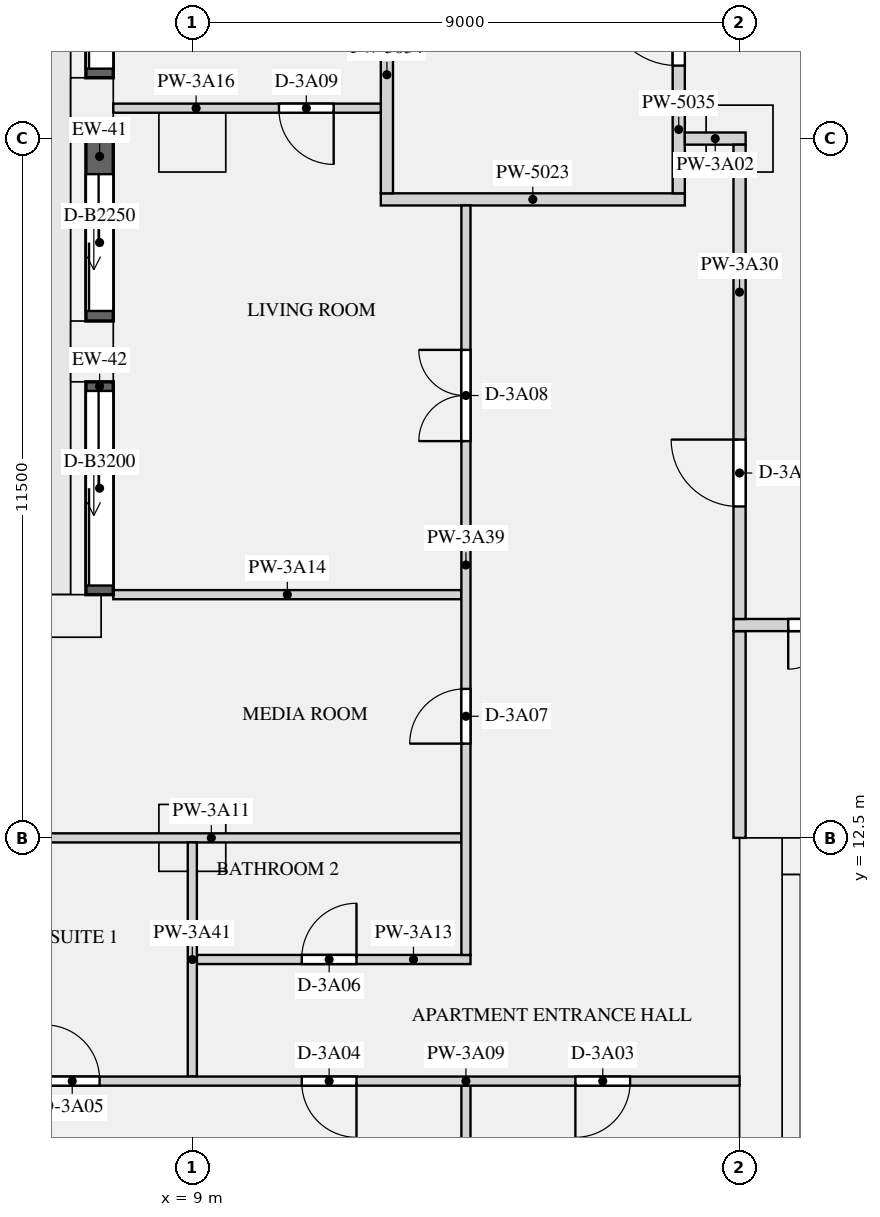
"""IFC4 building model, lengths in metres.
Left out: names, types, materials, properties, quantities, classifications, styles, units other than length and angle.
Written with IfcOpenShell. Run it as: python <this file> out.ifc"""

import sys

from ifc_helpers import new_model, si_unit, direction, frame, frame_2d, origin, origin_2d, place, context, subcontext, project, spatial, rectangle, extrude, element, fill, save


model = new_model("IFC4")
c1 = context("Model", 3, precision=1e-05, world=origin(), true_north=direction((0.0, 1.0)))
c2 = subcontext(c1, "Body", "Model", "MODEL_VIEW")
j1 = project(units=[si_unit("LENGTHUNIT", "METRE"), si_unit("PLANEANGLEUNIT", "RADIAN")], contexts=[c1])
p1 = place(None, origin())
s1 = spatial("IfcSite", under=j1, at=p1, CompositionType="ELEMENT")
p2 = place(p1, origin())
s2 = spatial("IfcBuilding", under=s1, at=p2, CompositionType="ELEMENT")
p3 = place(p2, frame((0.0, 0.0, 141.3)))
s3 = spatial("IfcBuildingStorey", under=s2, at=p3, CompositionType="ELEMENT", Elevation=141.3)
for number, where, z_axis, x_axis in (
    (1, (7.35, 24.5, 0.0), (0.0, 0.0, 1.0), (0.0, -1.0, 0.0)),
    (2, (7.35, 20.5, 0.0), (0.0, 0.0, 1.0), (0.0, -1.0, 0.0)),
    (3, (7.0, 16.15, 0.0), (0.0, 0.0, 1.0), (-1.0, 0.0, 0.0)),
):
    element("IfcColumn", number, at=place(p3, frame(where, z_axis=z_axis, x_axis=x_axis)), inside=s3, PredefinedType="USERDEFINED", context=c2, shape_type="SweptSolid", body=[
        extrude(rectangle(XDim=1.0, YDim=0.7, at=origin_2d()), origin(), (0.0, 0.0, 1.0), 3.15),
    ])
for number, where, z_axis, x_axis in (
    (4, (9.0, 24.0, 0.0), (0.0, 0.0, 1.0), (1.0, 0.0, 0.0)),
    (5, (18.0, 24.0, 0.0), (0.0, 0.0, 1.0), (1.0, 0.0, 0.0)),
    (6, (9.0, 12.5, 0.0), (0.0, 0.0, 1.0), (1.0, 0.0, 0.0)),
):
    element("IfcColumn", number, at=place(p3, frame(where, z_axis=z_axis, x_axis=x_axis)), inside=s3, PredefinedType="COLUMN", context=c2, shape_type="SweptSolid", body=[
        extrude(rectangle(XDim=1.1, YDim=1.1, at=origin_2d()), origin(), (0.0, 0.0, 1.0), 3.15),
    ])
p4 = place(p3, frame((18.35, 0.0, 0.0), z_axis=(0.0, 0.0, 1.0), x_axis=(0.0, 1.0, 0.0)))
e7 = element("IfcWall", 7, at=p4, inside=s3, PredefinedType="SHEAR", context=c2, shape_type="SweptSolid", body=[
    extrude(rectangle(XDim=12.5, YDim=0.7, at=frame_2d((6.25, 0.0))), origin(), (0.0, 0.0, 1.0), 3.15),
])
p5 = place(p3, frame((18.7, 12.2, 0.0), z_axis=(0.0, 0.0, 1.0), x_axis=(1.0, 0.0, 0.0)))
e8 = element("IfcWall", 8, at=p5, inside=s3, PredefinedType="SHEAR", context=c2, shape_type="SweptSolid", body=[
    extrude(rectangle(XDim=34.6, YDim=0.6, at=frame_2d((17.3, 0.0))), origin(), (0.0, 0.0, 1.0), 3.15),
])
p6 = place(p5, frame((24.475, 0.0, 0.0)))
e9 = element("IfcOpeningElement", 9, at=p6, cuts=e8, PredefinedType="OPENING", context=c2, shape_type="SweptSolid", body=[
    extrude(rectangle(XDim=1.1, YDim=2.1, at=frame_2d((0.55, 1.05))), frame((0.0, 0.31, 0.0), z_axis=(0.0, -1.0, 0.0), x_axis=(1.0, 0.0, 0.0)), (0.0, 0.0, 1.0), 0.62),
])
p7 = place(p5, frame((26.725, 0.0, 0.0)))
e10 = element("IfcOpeningElement", 10, at=p7, cuts=e8, PredefinedType="OPENING", context=c2, shape_type="SweptSolid", body=[
    extrude(rectangle(XDim=1.1, YDim=2.1, at=frame_2d((0.55, 1.05))), frame((0.0, 0.31, 0.0), z_axis=(0.0, -1.0, 0.0), x_axis=(1.0, 0.0, 0.0)), (0.0, 0.0, 1.0), 0.62),
])
p8 = place(p5, frame((28.975, 0.0, 0.0)))
e11 = element("IfcOpeningElement", 11, at=p8, cuts=e8, PredefinedType="OPENING", context=c2, shape_type="SweptSolid", body=[
    extrude(rectangle(XDim=1.1, YDim=2.1, at=frame_2d((0.55, 1.05))), frame((0.0, 0.31, 0.0), z_axis=(0.0, -1.0, 0.0), x_axis=(1.0, 0.0, 0.0)), (0.0, 0.0, 1.0), 0.62),
])
p9 = place(p5, frame((14.35, 0.0, 0.0)))
e12 = element("IfcOpeningElement", 12, at=p9, cuts=e8, PredefinedType="OPENING", context=c2, shape_type="SweptSolid", body=[
    extrude(rectangle(XDim=0.9, YDim=2.1, at=frame_2d((0.45, 1.05))), frame((0.0, 0.31, 0.0), z_axis=(0.0, -1.0, 0.0), x_axis=(1.0, 0.0, 0.0)), (0.0, 0.0, 1.0), 0.62),
])
p10 = place(p5, frame((1.45, 0.0, 0.0)))
e13 = element("IfcOpeningElement", 13, at=p10, cuts=e8, PredefinedType="OPENING", context=c2, shape_type="SweptSolid", body=[
    extrude(rectangle(XDim=1.2, YDim=2.1, at=frame_2d((0.6, 1.05))), frame((0.0, 0.31, 0.0), z_axis=(0.0, -1.0, 0.0), x_axis=(1.0, 0.0, 0.0)), (0.0, 0.0, 1.0), 0.62),
])
p11 = place(p5, frame((31.95, 0.0, 0.0)))
e14 = element("IfcOpeningElement", 14, at=p11, cuts=e8, PredefinedType="OPENING", context=c2, shape_type="SweptSolid", body=[
    extrude(rectangle(XDim=1.2, YDim=2.1, at=frame_2d((0.6, 1.05))), frame((0.0, 0.31, 0.0), z_axis=(0.0, -1.0, 0.0), x_axis=(1.0, 0.0, 0.0)), (0.0, 0.0, 1.0), 0.62),
])
p12 = place(p3, frame((18.85, 1.0, 0.0), z_axis=(0.0, 0.0, 1.0), x_axis=(0.0, 1.0, 0.0)))
e15 = element("IfcWall", 15, at=p12, inside=s3, PredefinedType="SHEAR", context=c2, shape_type="SweptSolid", body=[
    extrude(rectangle(XDim=10.9, YDim=0.3, at=frame_2d((5.45, 0.0))), origin(), (0.0, 0.0, 1.0), 3.15),
])
p13 = place(p3, frame((7.475, 28.0, 0.0), z_axis=(0.0, 0.0, 1.0), x_axis=(0.0, -1.0, 0.0)))
e16 = element("IfcWall", 16, at=p13, inside=s3, PredefinedType="SOLIDWALL", context=c2, shape_type="SweptSolid", body=[
    extrude(rectangle(XDim=3.0, YDim=0.45, at=frame_2d((1.5, 0.0))), origin(), (0.0, 0.0, 1.0), 2.83),
])
p14 = place(p13, frame((0.15, 0.0, 0.0)))
e17 = element("IfcOpeningElement", 17, at=p14, cuts=e16, PredefinedType="OPENING", context=c2, shape_type="SweptSolid", body=[
    extrude(rectangle(XDim=2.7, YDim=2.3, at=frame_2d((1.35, 1.15))), frame((0.0, 0.235, 0.0), z_axis=(0.0, -1.0, 0.0), x_axis=(1.0, 0.0, 0.0)), (0.0, 0.0, 1.0), 0.47),
])
p15 = place(p3, frame((7.475, 24.0, 0.0), z_axis=(0.0, 0.0, 1.0), x_axis=(0.0, -1.0, 0.0)))
e18 = element("IfcWall", 18, at=p15, inside=s3, PredefinedType="SOLIDWALL", context=c2, shape_type="SweptSolid", body=[
    extrude(rectangle(XDim=3.0, YDim=0.45, at=frame_2d((1.5, 0.0))), origin(), (0.0, 0.0, 1.0), 2.83),
])
p16 = place(p15, frame((0.585, 0.0, 0.0)))
e19 = element("IfcOpeningElement", 19, at=p16, cuts=e18, PredefinedType="OPENING", context=c2, shape_type="SweptSolid", body=[
    extrude(rectangle(XDim=2.25, YDim=2.3, at=frame_2d((1.125, 1.15))), frame((0.0, 0.235, 0.0), z_axis=(0.0, -1.0, 0.0), x_axis=(1.0, 0.0, 0.0)), (0.0, 0.0, 1.0), 0.47),
])
p17 = place(p3, frame((7.475, 20.0, 0.0), z_axis=(0.0, 0.0, 1.0), x_axis=(0.0, -1.0, 0.0)))
e20 = element("IfcWall", 20, at=p17, inside=s3, PredefinedType="SOLIDWALL", context=c2, shape_type="SweptSolid", body=[
    extrude(rectangle(XDim=3.5, YDim=0.45, at=frame_2d((1.75, 0.0))), origin(), (0.0, 0.0, 1.0), 2.83),
])
p18 = place(p17, frame((0.15, 0.0, 0.0)))
e21 = element("IfcOpeningElement", 21, at=p18, cuts=e20, PredefinedType="OPENING", context=c2, shape_type="SweptSolid", body=[
    extrude(rectangle(XDim=3.2, YDim=2.3, at=frame_2d((1.6, 1.15))), frame((0.0, 0.235, 0.0), z_axis=(0.0, -1.0, 0.0), x_axis=(1.0, 0.0, 0.0)), (0.0, 0.0, 1.0), 0.47),
])
p19 = place(p3, frame((12.1, 23.0, 0.0), z_axis=(0.0, 0.0, 1.0), x_axis=(1.0, 0.0, 0.0)))
e22 = element("IfcWall", 22, at=p19, inside=s3, PredefinedType="PARTITIONING", context=c2, shape_type="SweptSolid", body=[
    extrude(rectangle(XDim=5.0, YDim=0.2, at=frame_2d((2.5, 0.0))), origin(), (0.0, 0.0, 1.0), 2.83),
])
p20 = place(p3, frame((18.0, 12.5, 0.0), z_axis=(0.0, 0.0, 1.0), x_axis=(0.0, 1.0, 0.0)))
e23 = element("IfcWall", 23, at=p20, inside=s3, PredefinedType="PARTITIONING", context=c2, shape_type="SweptSolid", body=[
    extrude(rectangle(XDim=3.4, YDim=0.2, at=frame_2d((1.7, 0.0))), origin(), (0.0, 0.0, 1.0), 2.83),
])
p21 = place(p3, frame((12.2, 23.1, 0.0), z_axis=(0.0, 0.0, 1.0), x_axis=(0.0, 1.0, 0.0)))
e24 = element("IfcWall", 24, at=p21, inside=s3, PredefinedType="PARTITIONING", context=c2, shape_type="SweptSolid", body=[
    extrude(rectangle(XDim=3.9, YDim=0.2, at=frame_2d((1.95, 0.0))), origin(), (0.0, 0.0, 1.0), 2.83),
])
p22 = place(p3, frame((17.0, 23.1, 0.0), z_axis=(0.0, 0.0, 1.0), x_axis=(0.0, 1.0, 0.0)))
e25 = element("IfcWall", 25, at=p22, inside=s3, PredefinedType="PARTITIONING", context=c2, shape_type="SweptSolid", body=[
    extrude(rectangle(XDim=3.8, YDim=0.2, at=frame_2d((1.9, 0.0))), origin(), (0.0, 0.0, 1.0), 2.83),
])
p23 = place(p22, frame((2.1, 0.0, 0.0)))
e26 = element("IfcOpeningElement", 26, at=p23, cuts=e25, PredefinedType="OPENING", context=c2, shape_type="SweptSolid", body=[
    extrude(rectangle(XDim=1.2, YDim=2.1, at=frame_2d((0.6, 1.05))), frame((0.0, 0.11, 0.0), z_axis=(0.0, -1.0, 0.0), x_axis=(1.0, 0.0, 0.0)), (0.0, 0.0, 1.0), 0.22),
])
p24 = place(p3, frame((17.1, 24.0, 0.0), z_axis=(0.0, 0.0, 1.0), x_axis=(1.0, 0.0, 0.0)))
e27 = element("IfcWall", 27, at=p24, inside=s3, PredefinedType="PARTITIONING", context=c2, shape_type="SweptSolid", body=[
    extrude(rectangle(XDim=1.0, YDim=0.2, at=frame_2d((0.5, 0.0))), origin(), (0.0, 0.0, 1.0), 2.83),
])
p25 = place(p3, frame((5.2, 8.5, 0.0), z_axis=(0.0, 0.0, 1.0), x_axis=(1.0, 0.0, 0.0)))
e28 = element("IfcWall", 28, at=p25, inside=s3, PredefinedType="PARTITIONING", context=c2, shape_type="SweptSolid", body=[
    extrude(rectangle(XDim=12.8, YDim=0.15, at=frame_2d((6.4, 0.0))), origin(), (0.0, 0.0, 1.0), 2.83),
])
p26 = place(p25, frame((10.1, 0.0, 0.0)))
e29 = element("IfcOpeningElement", 29, at=p26, cuts=e28, PredefinedType="OPENING", context=c2, shape_type="SweptSolid", body=[
    extrude(rectangle(XDim=0.9, YDim=2.1, at=frame_2d((0.45, 1.05))), frame((0.0, 0.085, 0.0), z_axis=(0.0, -1.0, 0.0), x_axis=(1.0, 0.0, 0.0)), (0.0, 0.0, 1.0), 0.17),
])
p27 = place(p25, frame((5.6, 0.0, 0.0)))
e30 = element("IfcOpeningElement", 30, at=p27, cuts=e28, PredefinedType="OPENING", context=c2, shape_type="SweptSolid", body=[
    extrude(rectangle(XDim=0.9, YDim=2.1, at=frame_2d((0.45, 1.05))), frame((0.0, 0.085, 0.0), z_axis=(0.0, -1.0, 0.0), x_axis=(1.0, 0.0, 0.0)), (0.0, 0.0, 1.0), 0.17),
])
p28 = place(p25, frame((1.375, 0.0, 0.0)))
e31 = element("IfcOpeningElement", 31, at=p28, cuts=e28, PredefinedType="OPENING", context=c2, shape_type="SweptSolid", body=[
    extrude(rectangle(XDim=0.9, YDim=2.1, at=frame_2d((0.45, 1.05))), frame((0.0, 0.085, 0.0), z_axis=(0.0, -1.0, 0.0), x_axis=(1.0, 0.0, 0.0)), (0.0, 0.0, 1.0), 0.17),
])
p29 = place(p3, frame((5.2, 12.5, 0.0), z_axis=(0.0, 0.0, 1.0), x_axis=(1.0, 0.0, 0.0)))
e32 = element("IfcWall", 32, at=p29, inside=s3, PredefinedType="PARTITIONING", context=c2, shape_type="SweptSolid", body=[
    extrude(rectangle(XDim=8.225, YDim=0.15, at=frame_2d((4.113, 0.0))), origin(), (0.0, 0.0, 1.0), 2.83),
])
p30 = place(p3, frame((9.075, 10.5, 0.0), z_axis=(0.0, 0.0, 1.0), x_axis=(1.0, 0.0, 0.0)))
e33 = element("IfcWall", 33, at=p30, inside=s3, PredefinedType="PARTITIONING", context=c2, shape_type="SweptSolid", body=[
    extrude(rectangle(XDim=4.5, YDim=0.15, at=frame_2d((2.25, 0.0))), origin(), (0.0, 0.0, 1.0), 2.83),
])
p31 = place(p30, frame((1.725, 0.0, 0.0)))
e34 = element("IfcOpeningElement", 34, at=p31, cuts=e33, PredefinedType="OPENING", context=c2, shape_type="SweptSolid", body=[
    extrude(rectangle(XDim=0.9, YDim=2.1, at=frame_2d((0.45, 1.05))), frame((0.0, 0.085, 0.0), z_axis=(0.0, -1.0, 0.0), x_axis=(1.0, 0.0, 0.0)), (0.0, 0.0, 1.0), 0.17),
])
p32 = place(p3, frame((7.7, 16.5, 0.0), z_axis=(0.0, 0.0, 1.0), x_axis=(1.0, 0.0, 0.0)))
e35 = element("IfcWall", 35, at=p32, inside=s3, PredefinedType="PARTITIONING", context=c2, shape_type="SweptSolid", body=[
    extrude(rectangle(XDim=5.725, YDim=0.15, at=frame_2d((2.863, 0.0))), origin(), (0.0, 0.0, 1.0), 2.83),
])
p33 = place(p3, frame((7.7, 24.5, 0.0), z_axis=(0.0, 0.0, 1.0), x_axis=(1.0, 0.0, 0.0)))
e36 = element("IfcWall", 36, at=p33, inside=s3, PredefinedType="PARTITIONING", context=c2, shape_type="SweptSolid", body=[
    extrude(rectangle(XDim=4.4, YDim=0.15, at=frame_2d((2.2, 0.0))), origin(), (0.0, 0.0, 1.0), 2.83),
])
p34 = place(p33, frame((2.725, 0.0, 0.0)))
e37 = element("IfcOpeningElement", 37, at=p34, cuts=e36, PredefinedType="OPENING", context=c2, shape_type="SweptSolid", body=[
    extrude(rectangle(XDim=0.9, YDim=2.1, at=frame_2d((0.45, 1.05))), frame((0.0, 0.085, 0.0), z_axis=(0.0, -1.0, 0.0), x_axis=(1.0, 0.0, 0.0)), (0.0, 0.0, 1.0), 0.17),
])
p35 = place(p3, frame((17.9, 16.0, 0.0), z_axis=(0.0, 0.0, 1.0), x_axis=(1.0, 0.0, 0.0)))
e38 = element("IfcWall", 38, at=p35, inside=s3, PredefinedType="PARTITIONING", context=c2, shape_type="SweptSolid", body=[
    extrude(rectangle(XDim=36.2, YDim=0.2, at=frame_2d((18.1, 0.0))), origin(), (0.0, 0.0, 1.0), 2.83),
])
p36 = place(p35, frame((0.9, 0.0, 0.0)))
e39 = element("IfcOpeningElement", 39, at=p36, cuts=e38, PredefinedType="OPENING", context=c2, shape_type="SweptSolid", body=[
    extrude(rectangle(XDim=1.4, YDim=2.1, at=frame_2d((0.7, 1.05))), frame((0.0, 0.11, 0.0), z_axis=(0.0, -1.0, 0.0), x_axis=(1.0, 0.0, 0.0)), (0.0, 0.0, 1.0), 0.22),
])
p37 = place(p35, frame((33.9, 0.0, 0.0)))
e40 = element("IfcOpeningElement", 40, at=p37, cuts=e38, PredefinedType="OPENING", context=c2, shape_type="SweptSolid", body=[
    extrude(rectangle(XDim=1.4, YDim=2.1, at=frame_2d((0.7, 1.05))), frame((0.0, 0.11, 0.0), z_axis=(0.0, -1.0, 0.0), x_axis=(1.0, 0.0, 0.0)), (0.0, 0.0, 1.0), 0.22),
])
p38 = place(p3, frame((18.0, 16.1, 0.0), z_axis=(0.0, 0.0, 1.0), x_axis=(0.0, 1.0, 0.0)))
e41 = element("IfcWall", 41, at=p38, inside=s3, PredefinedType="PARTITIONING", context=c2, shape_type="SweptSolid", body=[
    extrude(rectangle(XDim=7.8, YDim=0.2, at=frame_2d((3.9, 0.0))), origin(), (0.0, 0.0, 1.0), 2.83),
])
p39 = place(p38, frame((1.85, 0.0, 0.0)))
e42 = element("IfcOpeningElement", 42, at=p39, cuts=e41, PredefinedType="OPENING", context=c2, shape_type="SweptSolid", body=[
    extrude(rectangle(XDim=1.1, YDim=2.1, at=frame_2d((0.55, 1.05))), frame((0.0, 0.11, 0.0), z_axis=(0.0, -1.0, 0.0), x_axis=(1.0, 0.0, 0.0)), (0.0, 0.0, 1.0), 0.22),
])
p40 = place(p3, frame((13.5, 0.7, 0.0), z_axis=(0.0, 0.0, 1.0), x_axis=(0.0, 1.0, 0.0)))
e43 = element("IfcWall", 43, at=p40, inside=s3, PredefinedType="PARTITIONING", context=c2, shape_type="SweptSolid", body=[
    extrude(rectangle(XDim=7.725, YDim=0.15, at=frame_2d((3.863, 0.0))), origin(), (0.0, 0.0, 1.0), 2.83),
])
p41 = place(p3, frame((13.5, 10.575, 0.0), z_axis=(0.0, 0.0, 1.0), x_axis=(0.0, 1.0, 0.0)))
e44 = element("IfcWall", 44, at=p41, inside=s3, PredefinedType="PARTITIONING", context=c2, shape_type="SweptSolid", body=[
    extrude(rectangle(XDim=12.325, YDim=0.15, at=frame_2d((6.163, 0.0))), origin(), (0.0, 0.0, 1.0), 2.83),
])
p42 = place(p41, frame((3.475, 0.0, 0.0)))
e45 = element("IfcOpeningElement", 45, at=p42, cuts=e44, PredefinedType="OPENING", context=c2, shape_type="SweptSolid", body=[
    extrude(rectangle(XDim=0.9, YDim=2.1, at=frame_2d((0.45, 1.05))), frame((0.0, 0.085, 0.0), z_axis=(0.0, -1.0, 0.0), x_axis=(1.0, 0.0, 0.0)), (0.0, 0.0, 1.0), 0.17),
])
p43 = place(p41, frame((8.45, 0.0, 0.0)))
e46 = element("IfcOpeningElement", 46, at=p43, cuts=e44, PredefinedType="OPENING", context=c2, shape_type="SweptSolid", body=[
    extrude(rectangle(XDim=1.5, YDim=2.1, at=frame_2d((0.75, 1.05))), frame((0.0, 0.085, 0.0), z_axis=(0.0, -1.0, 0.0), x_axis=(1.0, 0.0, 0.0)), (0.0, 0.0, 1.0), 0.17),
])
p44 = place(p3, frame((9.0, 8.575, 0.0), z_axis=(0.0, 0.0, 1.0), x_axis=(0.0, 1.0, 0.0)))
e47 = element("IfcWall", 47, at=p44, inside=s3, PredefinedType="PARTITIONING", context=c2, shape_type="SweptSolid", body=[
    extrude(rectangle(XDim=3.85, YDim=0.15, at=frame_2d((1.925, 0.0))), origin(), (0.0, 0.0, 1.0), 2.83),
])
p45 = place(p14, origin())
e48 = element("IfcDoor", 48, at=p45, inside=s3, OperationType="SLIDING_TO_LEFT", PredefinedType="DOOR", context=c2, shape_type="SweptSolid", body=[
    extrude(rectangle(XDim=2.7, YDim=2.3, at=frame_2d((1.35, 1.15))), frame((0.0, -0.07, 0.0), z_axis=(0.0, -1.0, 0.0), x_axis=(1.0, 0.0, 0.0)), (0.0, 0.0, 1.0), 0.05),
])
fill(e17, e48)
p46 = place(p16, origin())
e49 = element("IfcDoor", 49, at=p46, inside=s3, OperationType="SLIDING_TO_LEFT", PredefinedType="DOOR", context=c2, shape_type="SweptSolid", body=[
    extrude(rectangle(XDim=2.25, YDim=2.3, at=frame_2d((1.125, 1.15))), frame((0.0, -0.07, 0.0), z_axis=(0.0, -1.0, 0.0), x_axis=(1.0, 0.0, 0.0)), (0.0, 0.0, 1.0), 0.05),
])
fill(e19, e49)
p47 = place(p18, origin())
e50 = element("IfcDoor", 50, at=p47, inside=s3, OperationType="SLIDING_TO_LEFT", PredefinedType="DOOR", context=c2, shape_type="SweptSolid", body=[
    extrude(rectangle(XDim=3.2, YDim=2.3, at=frame_2d((1.6, 1.15))), frame((0.0, -0.07, 0.0), z_axis=(0.0, -1.0, 0.0), x_axis=(1.0, 0.0, 0.0)), (0.0, 0.0, 1.0), 0.05),
])
fill(e21, e50)
p48 = place(p23, origin())
e51 = element("IfcDoor", 51, at=p48, inside=s3, OperationType="SINGLE_SWING_RIGHT", PredefinedType="DOOR", context=c2, shape_type="SweptSolid", body=[
    extrude(rectangle(XDim=1.2, YDim=2.1, at=frame_2d((0.6, 1.05))), frame((0.0, 0.025, 0.0), z_axis=(0.0, -1.0, 0.0), x_axis=(1.0, 0.0, 0.0)), (0.0, 0.0, 1.0), 0.05),
])
fill(e26, e51)
p49 = place(p36, frame((1.4, 0.0, 0.0), z_axis=(0.0, 0.0, 1.0), x_axis=(-1.0, 0.0, 0.0)))
e52 = element("IfcDoor", 52, at=p49, inside=s3, OperationType="DOUBLE_DOOR_SINGLE_SWING", PredefinedType="DOOR", context=c2, shape_type="SweptSolid", body=[
    extrude(rectangle(XDim=1.4, YDim=2.1, at=frame_2d((0.7, 1.05))), frame((0.0, 0.025, 0.0), z_axis=(0.0, -1.0, 0.0), x_axis=(1.0, 0.0, 0.0)), (0.0, 0.0, 1.0), 0.05),
])
fill(e39, e52)
p50 = place(p26, frame((0.9, 0.0, 0.0), z_axis=(0.0, 0.0, 1.0), x_axis=(-1.0, 0.0, 0.0)))
e53 = element("IfcDoor", 53, at=p50, inside=s3, OperationType="SINGLE_SWING_RIGHT", PredefinedType="DOOR", context=c2, shape_type="SweptSolid", body=[
    extrude(rectangle(XDim=0.9, YDim=2.1, at=frame_2d((0.45, 1.05))), frame((0.0, 0.025, 0.0), z_axis=(0.0, -1.0, 0.0), x_axis=(1.0, 0.0, 0.0)), (0.0, 0.0, 1.0), 0.05),
])
fill(e29, e53)
p51 = place(p27, frame((0.9, 0.0, 0.0), z_axis=(0.0, 0.0, 1.0), x_axis=(-1.0, 0.0, 0.0)))
e54 = element("IfcDoor", 54, at=p51, inside=s3, OperationType="SINGLE_SWING_LEFT", PredefinedType="DOOR", context=c2, shape_type="SweptSolid", body=[
    extrude(rectangle(XDim=0.9, YDim=2.1, at=frame_2d((0.45, 1.05))), frame((0.0, 0.025, 0.0), z_axis=(0.0, -1.0, 0.0), x_axis=(1.0, 0.0, 0.0)), (0.0, 0.0, 1.0), 0.05),
])
fill(e30, e54)
p52 = place(p28, origin())
e55 = element("IfcDoor", 55, at=p52, inside=s3, OperationType="SINGLE_SWING_LEFT", PredefinedType="DOOR", context=c2, shape_type="SweptSolid", body=[
    extrude(rectangle(XDim=0.9, YDim=2.1, at=frame_2d((0.45, 1.05))), frame((0.0, 0.025, 0.0), z_axis=(0.0, -1.0, 0.0), x_axis=(1.0, 0.0, 0.0)), (0.0, 0.0, 1.0), 0.05),
])
fill(e31, e55)
p53 = place(p31, origin())
e56 = element("IfcDoor", 56, at=p53, inside=s3, OperationType="SINGLE_SWING_RIGHT", PredefinedType="DOOR", context=c2, shape_type="SweptSolid", body=[
    extrude(rectangle(XDim=0.9, YDim=2.1, at=frame_2d((0.45, 1.05))), frame((0.0, 0.025, 0.0), z_axis=(0.0, -1.0, 0.0), x_axis=(1.0, 0.0, 0.0)), (0.0, 0.0, 1.0), 0.05),
])
fill(e34, e56)
p54 = place(p42, origin())
e57 = element("IfcDoor", 57, at=p54, inside=s3, OperationType="SINGLE_SWING_LEFT", PredefinedType="DOOR", context=c2, shape_type="SweptSolid", body=[
    extrude(rectangle(XDim=0.9, YDim=2.1, at=frame_2d((0.45, 1.05))), frame((0.0, 0.025, 0.0), z_axis=(0.0, -1.0, 0.0), x_axis=(1.0, 0.0, 0.0)), (0.0, 0.0, 1.0), 0.05),
])
fill(e45, e57)
p55 = place(p43, origin())
e58 = element("IfcDoor", 58, at=p55, inside=s3, OperationType="DOUBLE_DOOR_SINGLE_SWING", PredefinedType="DOOR", context=c2, shape_type="SweptSolid", body=[
    extrude(rectangle(XDim=1.5, YDim=2.1, at=frame_2d((0.75, 1.05))), frame((0.0, 0.025, 0.0), z_axis=(0.0, -1.0, 0.0), x_axis=(1.0, 0.0, 0.0)), (0.0, 0.0, 1.0), 0.05),
])
fill(e46, e58)
p56 = place(p34, frame((0.9, 0.0, 0.0), z_axis=(0.0, 0.0, 1.0), x_axis=(-1.0, 0.0, 0.0)))
e59 = element("IfcDoor", 59, at=p56, inside=s3, OperationType="SINGLE_SWING_LEFT", PredefinedType="DOOR", context=c2, shape_type="SweptSolid", body=[
    extrude(rectangle(XDim=0.9, YDim=2.1, at=frame_2d((0.45, 1.05))), frame((0.0, 0.025, 0.0), z_axis=(0.0, -1.0, 0.0), x_axis=(1.0, 0.0, 0.0)), (0.0, 0.0, 1.0), 0.05),
])
fill(e37, e59)
p57 = place(p39, origin())
e60 = element("IfcDoor", 60, at=p57, inside=s3, OperationType="SINGLE_SWING_RIGHT", PredefinedType="DOOR", context=c2, shape_type="SweptSolid", body=[
    extrude(rectangle(XDim=1.1, YDim=2.1, at=frame_2d((0.55, 1.05))), frame((0.0, 0.025, 0.0), z_axis=(0.0, -1.0, 0.0), x_axis=(1.0, 0.0, 0.0)), (0.0, 0.0, 1.0), 0.05),
])
fill(e42, e60)
save(model, sys.argv[1])
